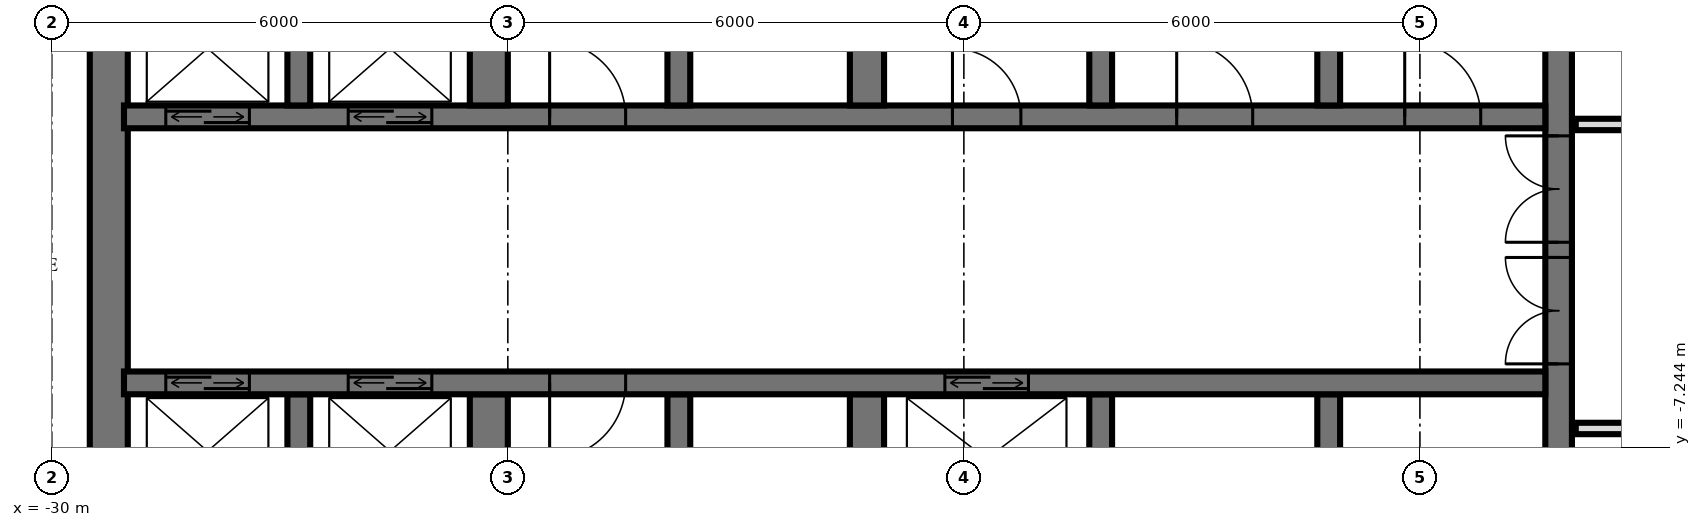
"""IFC4 building model, lengths in metres.
Left out: names, types, materials, properties, quantities, classifications, styles, units other than length and angle.
Written with IfcOpenShell. Run it as: python <this file> out.ifc"""

import sys

from ifc_helpers import new_model, si_unit, direction, frame, frame_2d, origin, place, context, subcontext, project, spatial, rectangle, extrude, element, fill, save


model = new_model("IFC4")
c1 = context("Model", 3, precision=1e-05, world=origin(), true_north=direction((0.0, 1.0)))
c2 = subcontext(c1, "Body", "Model", "MODEL_VIEW")
j1 = project(units=[si_unit("LENGTHUNIT", "METRE"), si_unit("PLANEANGLEUNIT", "RADIAN")], contexts=[c1])
p1 = place(None, origin())
s1 = spatial("IfcSite", under=j1, at=p1, CompositionType="ELEMENT")
p2 = place(p1, origin())
s2 = spatial("IfcBuilding", under=s1, at=p2, CompositionType="ELEMENT")
p3 = place(p2, frame((0.0, 0.0, 60.0)))
s3 = spatial("IfcBuildingStorey", under=s2, at=p3, CompositionType="ELEMENT", Elevation=60.0)
p4 = place(p3, frame((-10.175, -14.55, 0.0), z_axis=(0.0, 0.0, 1.0), x_axis=(0.0, 1.0, 0.0)))
e1 = element("IfcWall", 1, at=p4, inside=s3, PredefinedType="SHEAR", context=c2, shape_type="SweptSolid", body=[
    extrude(rectangle(XDim=14.1, YDim=0.35, at=frame_2d((7.05, 0.0))), origin(), (0.0, 0.0, 1.0), 3.6),
])
p5 = place(p4, frame((8.4, 0.0, 0.0)))
e2 = element("IfcOpeningElement", 2, at=p5, cuts=e1, PredefinedType="OPENING", context=c2, shape_type="SweptSolid", body=[
    extrude(rectangle(XDim=1.4, YDim=2.4, at=frame_2d((0.7, 1.2))), frame((0.0, 0.185, 0.0), z_axis=(0.0, -1.0, 0.0), x_axis=(1.0, 0.0, 0.0)), (0.0, 0.0, 1.0), 0.37),
])
p6 = place(p4, frame((10.0, 0.0, 0.0)))
e3 = element("IfcOpeningElement", 3, at=p6, cuts=e1, PredefinedType="OPENING", context=c2, shape_type="SweptSolid", body=[
    extrude(rectangle(XDim=1.4, YDim=2.4, at=frame_2d((0.7, 1.2))), frame((0.0, 0.185, 0.0), z_axis=(0.0, -1.0, 0.0), x_axis=(1.0, 0.0, 0.0)), (0.0, 0.0, 1.0), 0.37),
])
p7 = place(p4, frame((4.0, 0.0, 0.0)))
e4 = element("IfcOpeningElement", 4, at=p7, cuts=e1, PredefinedType="OPENING", context=c2, shape_type="SweptSolid", body=[
    extrude(rectangle(XDim=1.2, YDim=2.1, at=frame_2d((0.6, 1.05))), frame((0.0, 0.185, 0.0), z_axis=(0.0, -1.0, 0.0), x_axis=(1.0, 0.0, 0.0)), (0.0, 0.0, 1.0), 0.37),
])
p8 = place(p3, frame((-29.25, -14.55, 0.0), z_axis=(0.0, 0.0, 1.0), x_axis=(0.0, 1.0, 0.0)))
e5 = element("IfcWall", 5, at=p8, inside=s3, PredefinedType="SHEAR", context=c2, shape_type="SweptSolid", body=[
    extrude(rectangle(XDim=14.1, YDim=0.5, at=frame_2d((7.05, 0.0))), origin(), (0.0, 0.0, 1.0), 3.6),
])
p9 = place(p3, frame((-29.05, -2.9, 0.0), z_axis=(0.0, 0.0, 1.0), x_axis=(1.0, 0.0, 0.0)))
e6 = element("IfcWall", 6, at=p9, inside=s3, PredefinedType="SHEAR", context=c2, shape_type="SweptSolid", body=[
    extrude(rectangle(XDim=18.7, YDim=0.3, at=frame_2d((9.35, 0.0))), origin(), (0.0, 0.0, 1.0), 3.6),
])
p10 = place(p9, frame((2.95, 0.0, 0.0)))
e7 = element("IfcOpeningElement", 7, at=p10, cuts=e6, PredefinedType="OPENING", context=c2, shape_type="SweptSolid", body=[
    extrude(rectangle(XDim=1.1, YDim=2.1, at=frame_2d((0.55, 1.05))), frame((0.0, 0.16, 0.0), z_axis=(0.0, -1.0, 0.0), x_axis=(1.0, 0.0, 0.0)), (0.0, 0.0, 1.0), 0.32),
])
p11 = place(p9, frame((0.55, 0.0, 0.0)))
e8 = element("IfcOpeningElement", 8, at=p11, cuts=e6, PredefinedType="OPENING", context=c2, shape_type="SweptSolid", body=[
    extrude(rectangle(XDim=1.1, YDim=2.1, at=frame_2d((0.55, 1.05))), frame((0.0, 0.16, 0.0), z_axis=(0.0, -1.0, 0.0), x_axis=(1.0, 0.0, 0.0)), (0.0, 0.0, 1.0), 0.32),
])
p12 = place(p9, frame((10.9, 0.0, 0.0)))
e9 = element("IfcOpeningElement", 9, at=p12, cuts=e6, PredefinedType="OPENING", context=c2, shape_type="SweptSolid", body=[
    extrude(rectangle(XDim=0.9, YDim=2.1, at=frame_2d((0.45, 1.05))), frame((0.0, 0.16, 0.0), z_axis=(0.0, -1.0, 0.0), x_axis=(1.0, 0.0, 0.0)), (0.0, 0.0, 1.0), 0.32),
])
p13 = place(p9, frame((16.85, 0.0, 0.0)))
e10 = element("IfcOpeningElement", 10, at=p13, cuts=e6, PredefinedType="OPENING", context=c2, shape_type="SweptSolid", body=[
    extrude(rectangle(XDim=1.0, YDim=2.1, at=frame_2d((0.5, 1.05))), frame((0.0, 0.16, 0.0), z_axis=(0.0, -1.0, 0.0), x_axis=(1.0, 0.0, 0.0)), (0.0, 0.0, 1.0), 0.32),
])
p14 = place(p9, frame((13.85, 0.0, 0.0)))
e11 = element("IfcOpeningElement", 11, at=p14, cuts=e6, PredefinedType="OPENING", context=c2, shape_type="SweptSolid", body=[
    extrude(rectangle(XDim=1.0, YDim=2.1, at=frame_2d((0.5, 1.05))), frame((0.0, 0.16, 0.0), z_axis=(0.0, -1.0, 0.0), x_axis=(1.0, 0.0, 0.0)), (0.0, 0.0, 1.0), 0.32),
])
p15 = place(p9, frame((5.6, 0.0, 0.0)))
e12 = element("IfcOpeningElement", 12, at=p15, cuts=e6, PredefinedType="OPENING", context=c2, shape_type="SweptSolid", body=[
    extrude(rectangle(XDim=1.0, YDim=2.1, at=frame_2d((0.5, 1.05))), frame((0.0, 0.16, 0.0), z_axis=(0.0, -1.0, 0.0), x_axis=(1.0, 0.0, 0.0)), (0.0, 0.0, 1.0), 0.32),
])
p16 = place(p3, frame((-29.05, -6.4, 0.0), z_axis=(0.0, 0.0, 1.0), x_axis=(1.0, 0.0, 0.0)))
e13 = element("IfcWall", 13, at=p16, inside=s3, PredefinedType="SHEAR", context=c2, shape_type="SweptSolid", body=[
    extrude(rectangle(XDim=18.7, YDim=0.3, at=frame_2d((9.35, 0.0))), origin(), (0.0, 0.0, 1.0), 3.6),
])
p17 = place(p16, frame((2.95, 0.0, 0.0)))
e14 = element("IfcOpeningElement", 14, at=p17, cuts=e13, PredefinedType="OPENING", context=c2, shape_type="SweptSolid", body=[
    extrude(rectangle(XDim=1.1, YDim=2.1, at=frame_2d((0.55, 1.05))), frame((0.0, 0.16, 0.0), z_axis=(0.0, -1.0, 0.0), x_axis=(1.0, 0.0, 0.0)), (0.0, 0.0, 1.0), 0.32),
])
p18 = place(p16, frame((0.55, 0.0, 0.0)))
e15 = element("IfcOpeningElement", 15, at=p18, cuts=e13, PredefinedType="OPENING", context=c2, shape_type="SweptSolid", body=[
    extrude(rectangle(XDim=1.1, YDim=2.1, at=frame_2d((0.55, 1.05))), frame((0.0, 0.16, 0.0), z_axis=(0.0, -1.0, 0.0), x_axis=(1.0, 0.0, 0.0)), (0.0, 0.0, 1.0), 0.32),
])
p19 = place(p16, frame((10.8, 0.0, 0.0)))
e16 = element("IfcOpeningElement", 16, at=p19, cuts=e13, PredefinedType="OPENING", context=c2, shape_type="SweptSolid", body=[
    extrude(rectangle(XDim=1.1, YDim=2.1, at=frame_2d((0.55, 1.05))), frame((0.0, 0.16, 0.0), z_axis=(0.0, -1.0, 0.0), x_axis=(1.0, 0.0, 0.0)), (0.0, 0.0, 1.0), 0.32),
])
p20 = place(p16, frame((5.6, 0.0, 0.0)))
e17 = element("IfcOpeningElement", 17, at=p20, cuts=e13, PredefinedType="OPENING", context=c2, shape_type="SweptSolid", body=[
    extrude(rectangle(XDim=1.0, YDim=2.1, at=frame_2d((0.5, 1.05))), frame((0.0, 0.16, 0.0), z_axis=(0.0, -1.0, 0.0), x_axis=(1.0, 0.0, 0.0)), (0.0, 0.0, 1.0), 0.32),
])
for number, where, z_axis, x_axis in (
    (18, (-13.2, -2.75, 0.0), (0.0, 0.0, 1.0), (0.0, 1.0, 0.0)),
    (19, (-13.2, -8.85, 0.0), (0.0, 0.0, 1.0), (0.0, 1.0, 0.0)),
    (20, (-16.2, -2.75, 0.0), (0.0, 0.0, 1.0), (0.0, 1.0, 0.0)),
    (21, (-16.2, -8.85, 0.0), (0.0, 0.0, 1.0), (0.0, 1.0, 0.0)),
):
    element("IfcWall", number, at=place(p3, frame(where, z_axis=z_axis, x_axis=x_axis)), inside=s3, PredefinedType="SHEAR", context=c2, shape_type="SweptSolid", body=[
        extrude(rectangle(XDim=2.3, YDim=0.3, at=frame_2d((1.15, 0.0))), origin(), (0.0, 0.0, 1.0), 3.6),
    ])
for number, where, z_axis, x_axis in (
    (22, (-19.275, -2.75, 0.0), (0.0, 0.0, 1.0), (0.0, 1.0, 0.0)),
    (23, (-19.275, -8.85, 0.0), (0.0, 0.0, 1.0), (0.0, 1.0, 0.0)),
):
    element("IfcWall", number, at=place(p3, frame(where, z_axis=z_axis, x_axis=x_axis)), inside=s3, PredefinedType="SHEAR", context=c2, shape_type="SweptSolid", body=[
        extrude(rectangle(XDim=2.3, YDim=0.45, at=frame_2d((1.15, 0.0))), origin(), (0.0, 0.0, 1.0), 3.6),
    ])
for number, where, z_axis, x_axis in (
    (24, (-21.75, -2.75, 0.0), (0.0, 0.0, 1.0), (0.0, 1.0, 0.0)),
    (25, (-21.75, -8.85, 0.0), (0.0, 0.0, 1.0), (0.0, 1.0, 0.0)),
):
    element("IfcWall", number, at=place(p3, frame(where, z_axis=z_axis, x_axis=x_axis)), inside=s3, PredefinedType="SHEAR", context=c2, shape_type="SweptSolid", body=[
        extrude(rectangle(XDim=2.3, YDim=0.3, at=frame_2d((1.15, 0.0))), origin(), (0.0, 0.0, 1.0), 3.6),
    ])
for number, where, z_axis, x_axis in (
    (26, (-24.25, -2.75, 0.0), (0.0, 0.0, 1.0), (0.0, 1.0, 0.0)),
    (27, (-24.25, -8.85, 0.0), (0.0, 0.0, 1.0), (0.0, 1.0, 0.0)),
):
    element("IfcWall", number, at=place(p3, frame(where, z_axis=z_axis, x_axis=x_axis)), inside=s3, PredefinedType="SHEAR", context=c2, shape_type="SweptSolid", body=[
        extrude(rectangle(XDim=2.3, YDim=0.5, at=frame_2d((1.15, 0.0))), origin(), (0.0, 0.0, 1.0), 3.6),
    ])
for number, where, z_axis, x_axis in (
    (28, (-26.75, -2.75, 0.0), (0.0, 0.0, 1.0), (0.0, 1.0, 0.0)),
    (29, (-26.75, -8.85, 0.0), (0.0, 0.0, 1.0), (0.0, 1.0, 0.0)),
):
    element("IfcWall", number, at=place(p3, frame(where, z_axis=z_axis, x_axis=x_axis)), inside=s3, PredefinedType="SHEAR", context=c2, shape_type="SweptSolid", body=[
        extrude(rectangle(XDim=2.3, YDim=0.3, at=frame_2d((1.15, 0.0))), origin(), (0.0, 0.0, 1.0), 3.6),
    ])
p21 = place(p3, frame((-9.95, -7.0, 0.0), z_axis=(0.0, 0.0, 1.0), x_axis=(1.0, 0.0, 0.0)))
e30 = element("IfcWall", 30, at=p21, inside=s3, PredefinedType="PARTITIONING", context=c2, shape_type="SweptSolid", body=[
    extrude(rectangle(XDim=19.9, YDim=0.15, at=frame_2d((9.95, 0.0))), origin(), (0.0, 0.0, 1.0), 3.32),
])
p22 = place(p21, frame((9.45, 0.0, 0.0)))
e31 = element("IfcOpeningElement", 31, at=p22, cuts=e30, PredefinedType="OPENING", context=c2, shape_type="SweptSolid", body=[
    extrude(rectangle(XDim=1.0, YDim=2.1, at=frame_2d((0.5, 1.05))), frame((0.0, 0.085, 0.0), z_axis=(0.0, -1.0, 0.0), x_axis=(1.0, 0.0, 0.0)), (0.0, 0.0, 1.0), 0.17),
])
p23 = place(p21, frame((15.45, 0.0, 0.0)))
e32 = element("IfcOpeningElement", 32, at=p23, cuts=e30, PredefinedType="OPENING", context=c2, shape_type="SweptSolid", body=[
    extrude(rectangle(XDim=1.0, YDim=2.1, at=frame_2d((0.5, 1.05))), frame((0.0, 0.085, 0.0), z_axis=(0.0, -1.0, 0.0), x_axis=(1.0, 0.0, 0.0)), (0.0, 0.0, 1.0), 0.17),
])
p24 = place(p3, frame((-9.95, -3.0, 0.0), z_axis=(0.0, 0.0, 1.0), x_axis=(1.0, 0.0, 0.0)))
e33 = element("IfcWall", 33, at=p24, inside=s3, PredefinedType="PARTITIONING", context=c2, shape_type="SweptSolid", body=[
    extrude(rectangle(XDim=19.9, YDim=0.15, at=frame_2d((9.95, 0.0))), origin(), (0.0, 0.0, 1.0), 3.32),
])
p25 = place(p24, frame((0.95, 0.0, 0.0)))
e34 = element("IfcOpeningElement", 34, at=p25, cuts=e33, PredefinedType="OPENING", context=c2, shape_type="SweptSolid", body=[
    extrude(rectangle(XDim=1.0, YDim=2.1, at=frame_2d((0.5, 1.05))), frame((0.0, 0.085, 0.0), z_axis=(0.0, -1.0, 0.0), x_axis=(1.0, 0.0, 0.0)), (0.0, 0.0, 1.0), 0.17),
])
p26 = place(p24, frame((3.7, 0.0, 0.0)))
e35 = element("IfcOpeningElement", 35, at=p26, cuts=e33, PredefinedType="OPENING", context=c2, shape_type="SweptSolid", body=[
    extrude(rectangle(XDim=1.0, YDim=2.1, at=frame_2d((0.5, 1.05))), frame((0.0, 0.085, 0.0), z_axis=(0.0, -1.0, 0.0), x_axis=(1.0, 0.0, 0.0)), (0.0, 0.0, 1.0), 0.17),
])
p27 = place(p24, frame((7.95, 0.0, 0.0)))
e36 = element("IfcOpeningElement", 36, at=p27, cuts=e33, PredefinedType="OPENING", context=c2, shape_type="SweptSolid", body=[
    extrude(rectangle(XDim=1.0, YDim=2.1, at=frame_2d((0.5, 1.05))), frame((0.0, 0.085, 0.0), z_axis=(0.0, -1.0, 0.0), x_axis=(1.0, 0.0, 0.0)), (0.0, 0.0, 1.0), 0.17),
])
p28 = place(p24, frame((15.2, 0.0, 0.0)))
e37 = element("IfcOpeningElement", 37, at=p28, cuts=e33, PredefinedType="OPENING", context=c2, shape_type="SweptSolid", body=[
    extrude(rectangle(XDim=1.0, YDim=2.1, at=frame_2d((0.5, 1.05))), frame((0.0, 0.085, 0.0), z_axis=(0.0, -1.0, 0.0), x_axis=(1.0, 0.0, 0.0)), (0.0, 0.0, 1.0), 0.17),
])
p29 = place(p10, origin())
e38 = element("IfcDoor", 38, at=p29, inside=s3, OperationType="DOUBLE_DOOR_SLIDING", PredefinedType="USERDEFINED", context=c2, shape_type="SweptSolid", body=[
    extrude(rectangle(XDim=1.1, YDim=2.1, at=frame_2d((0.55, 1.05))), frame((0.0, 0.025, 0.0), z_axis=(0.0, -1.0, 0.0), x_axis=(1.0, 0.0, 0.0)), (0.0, 0.0, 1.0), 0.05),
])
fill(e7, e38)
p30 = place(p11, origin())
e39 = element("IfcDoor", 39, at=p30, inside=s3, OperationType="DOUBLE_DOOR_SLIDING", PredefinedType="USERDEFINED", context=c2, shape_type="SweptSolid", body=[
    extrude(rectangle(XDim=1.1, YDim=2.1, at=frame_2d((0.55, 1.05))), frame((0.0, 0.025, 0.0), z_axis=(0.0, -1.0, 0.0), x_axis=(1.0, 0.0, 0.0)), (0.0, 0.0, 1.0), 0.05),
])
fill(e8, e39)
p31 = place(p17, origin())
e40 = element("IfcDoor", 40, at=p31, inside=s3, OperationType="DOUBLE_DOOR_SLIDING", PredefinedType="USERDEFINED", context=c2, shape_type="SweptSolid", body=[
    extrude(rectangle(XDim=1.1, YDim=2.1, at=frame_2d((0.55, 1.05))), frame((0.0, 0.025, 0.0), z_axis=(0.0, -1.0, 0.0), x_axis=(1.0, 0.0, 0.0)), (0.0, 0.0, 1.0), 0.05),
])
fill(e14, e40)
p32 = place(p18, origin())
e41 = element("IfcDoor", 41, at=p32, inside=s3, OperationType="DOUBLE_DOOR_SLIDING", PredefinedType="USERDEFINED", context=c2, shape_type="SweptSolid", body=[
    extrude(rectangle(XDim=1.1, YDim=2.1, at=frame_2d((0.55, 1.05))), frame((0.0, 0.025, 0.0), z_axis=(0.0, -1.0, 0.0), x_axis=(1.0, 0.0, 0.0)), (0.0, 0.0, 1.0), 0.05),
])
fill(e15, e41)
p33 = place(p19, origin())
e42 = element("IfcDoor", 42, at=p33, inside=s3, OperationType="DOUBLE_DOOR_SLIDING", PredefinedType="USERDEFINED", context=c2, shape_type="SweptSolid", body=[
    extrude(rectangle(XDim=1.1, YDim=2.1, at=frame_2d((0.55, 1.05))), frame((0.0, 0.025, 0.0), z_axis=(0.0, -1.0, 0.0), x_axis=(1.0, 0.0, 0.0)), (0.0, 0.0, 1.0), 0.05),
])
fill(e16, e42)
p34 = place(p5, origin())
e43 = element("IfcDoor", 43, at=p34, inside=s3, OperationType="DOUBLE_DOOR_SINGLE_SWING", PredefinedType="DOOR", context=c2, shape_type="SweptSolid", body=[
    extrude(rectangle(XDim=1.4, YDim=2.4, at=frame_2d((0.7, 1.2))), frame((0.0, 0.025, 0.0), z_axis=(0.0, -1.0, 0.0), x_axis=(1.0, 0.0, 0.0)), (0.0, 0.0, 1.0), 0.05),
])
fill(e2, e43)
p35 = place(p6, origin())
e44 = element("IfcDoor", 44, at=p35, inside=s3, OperationType="DOUBLE_DOOR_SINGLE_SWING", PredefinedType="DOOR", context=c2, shape_type="SweptSolid", body=[
    extrude(rectangle(XDim=1.4, YDim=2.4, at=frame_2d((0.7, 1.2))), frame((0.0, 0.025, 0.0), z_axis=(0.0, -1.0, 0.0), x_axis=(1.0, 0.0, 0.0)), (0.0, 0.0, 1.0), 0.05),
])
fill(e3, e44)
p36 = place(p12, origin())
e45 = element("IfcDoor", 45, at=p36, inside=s3, OperationType="SINGLE_SWING_RIGHT", PredefinedType="DOOR", context=c2, shape_type="SweptSolid", body=[
    extrude(rectangle(XDim=0.9, YDim=2.1, at=frame_2d((0.45, 1.05))), frame((0.0, 0.025, 0.0), z_axis=(0.0, -1.0, 0.0), x_axis=(1.0, 0.0, 0.0)), (0.0, 0.0, 1.0), 0.05),
])
fill(e9, e45)
p37 = place(p13, origin())
e46 = element("IfcDoor", 46, at=p37, inside=s3, OperationType="SINGLE_SWING_RIGHT", PredefinedType="DOOR", context=c2, shape_type="SweptSolid", body=[
    extrude(rectangle(XDim=1.0, YDim=2.1, at=frame_2d((0.5, 1.05))), frame((0.0, 0.025, 0.0), z_axis=(0.0, -1.0, 0.0), x_axis=(1.0, 0.0, 0.0)), (0.0, 0.0, 1.0), 0.05),
])
fill(e10, e46)
p38 = place(p14, origin())
e47 = element("IfcDoor", 47, at=p38, inside=s3, OperationType="SINGLE_SWING_RIGHT", PredefinedType="DOOR", context=c2, shape_type="SweptSolid", body=[
    extrude(rectangle(XDim=1.0, YDim=2.1, at=frame_2d((0.5, 1.05))), frame((0.0, 0.025, 0.0), z_axis=(0.0, -1.0, 0.0), x_axis=(1.0, 0.0, 0.0)), (0.0, 0.0, 1.0), 0.05),
])
fill(e11, e47)
p39 = place(p15, origin())
e48 = element("IfcDoor", 48, at=p39, inside=s3, OperationType="SINGLE_SWING_RIGHT", PredefinedType="DOOR", context=c2, shape_type="SweptSolid", body=[
    extrude(rectangle(XDim=1.0, YDim=2.1, at=frame_2d((0.5, 1.05))), frame((0.0, 0.025, 0.0), z_axis=(0.0, -1.0, 0.0), x_axis=(1.0, 0.0, 0.0)), (0.0, 0.0, 1.0), 0.05),
])
fill(e12, e48)
p40 = place(p20, frame((0.5, 0.0, 0.0), z_axis=(0.0, 0.0, 1.0), x_axis=(-1.0, 0.0, 0.0)))
e49 = element("IfcDoor", 49, at=p40, inside=s3, OperationType="SINGLE_SWING_LEFT", PredefinedType="DOOR", context=c2, shape_type="SweptSolid", body=[
    extrude(rectangle(XDim=1.0, YDim=2.1, at=frame_2d((0.0, 1.05))), frame((0.0, -0.025, 0.0), z_axis=(0.0, 1.0, 0.0), x_axis=(-1.0, 0.0, 0.0)), (0.0, 0.0, 1.0), 0.05),
])
fill(e17, e49)
save(model, sys.argv[1])
